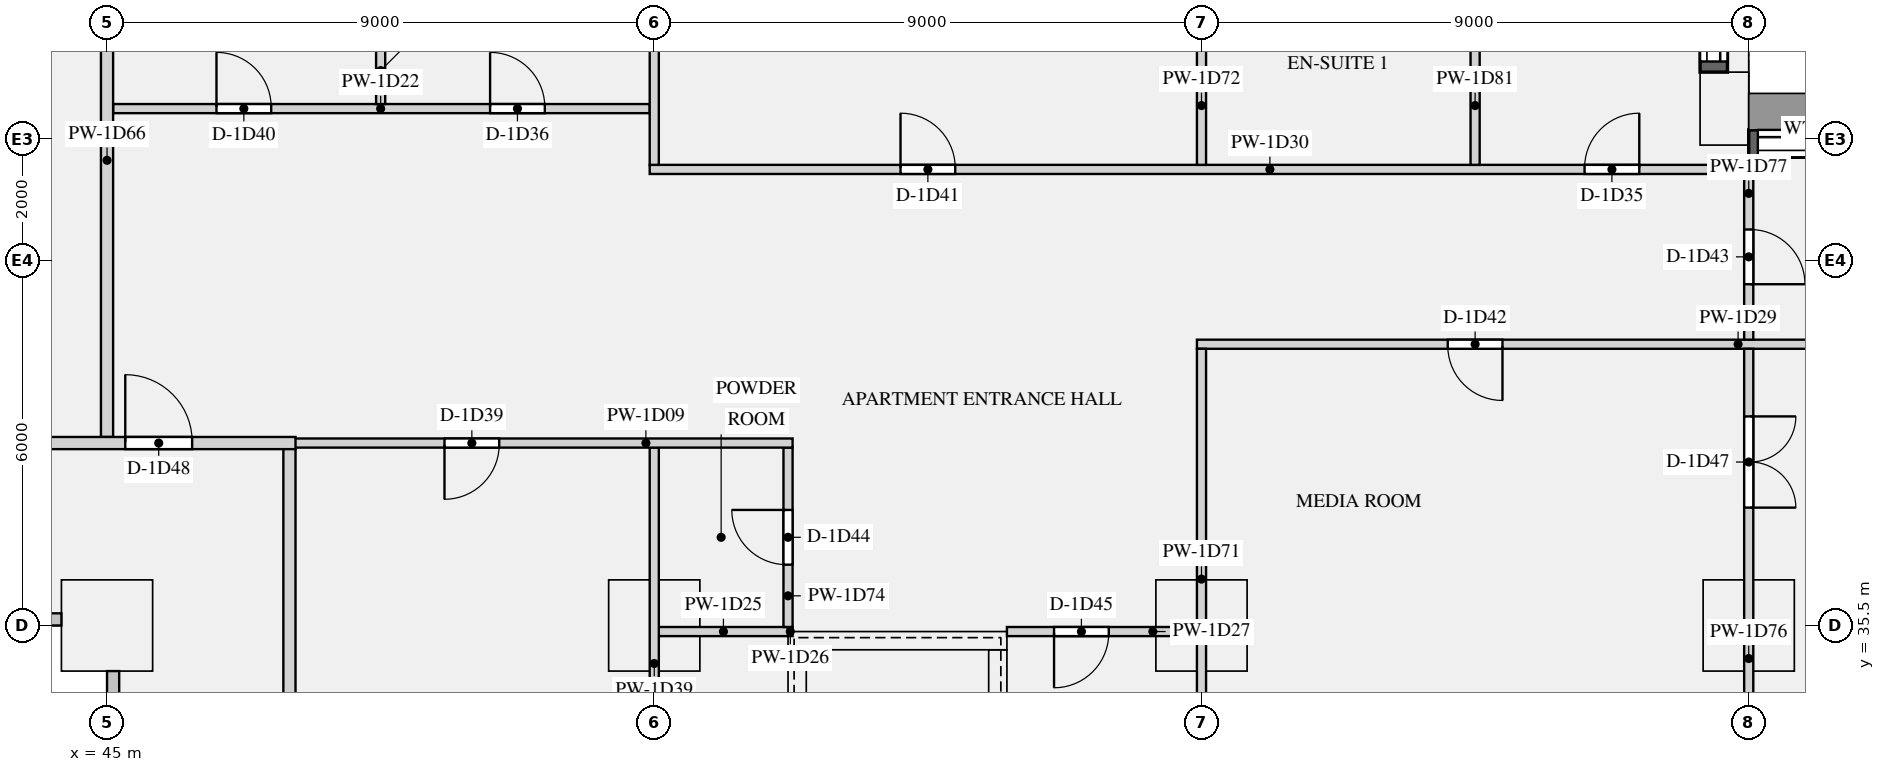
"""IFC4 building model, lengths in metres.
Left out: names, types, materials, properties, quantities, classifications, styles, units other than length and angle.
Written with IfcOpenShell. Run it as: python <this file> out.ifc"""

import sys

from ifc_helpers import new_model, si_unit, direction, frame, frame_2d, origin, origin_2d, place, context, subcontext, project, spatial, rectangle, extrude, element, fill, save


model = new_model("IFC4")
c1 = context("Model", 3, precision=1e-05, world=origin(), true_north=direction((0.0, 1.0)))
c2 = subcontext(c1, "Body", "Model", "MODEL_VIEW")
j1 = project(units=[si_unit("LENGTHUNIT", "METRE"), si_unit("PLANEANGLEUNIT", "RADIAN")], contexts=[c1])
p1 = place(None, origin())
s1 = spatial("IfcSite", under=j1, at=p1, CompositionType="ELEMENT")
p2 = place(p1, origin())
s2 = spatial("IfcBuilding", under=s1, at=p2, CompositionType="ELEMENT")
p3 = place(p2, frame((0.0, 0.0, 47.85)))
s3 = spatial("IfcBuildingStorey", under=s2, at=p3, CompositionType="ELEMENT", Elevation=47.85)
p4 = place(p3, frame((71.6, 44.0, 0.0), z_axis=(0.0, 0.0, 1.0), x_axis=(0.0, 1.0, 0.0)))
e1 = element("IfcColumn", 1, at=p4, inside=s3, PredefinedType="USERDEFINED", context=c2, shape_type="SweptSolid", body=[
    extrude(rectangle(XDim=1.2, YDim=0.8, at=origin_2d()), origin(), (0.0, 0.0, 1.0), 3.15),
])
for number, where, z_axis, x_axis in (
    (2, (45.0, 35.5, 0.0), (0.0, 0.0, 1.0), (1.0, 0.0, 0.0)),
    (3, (54.0, 35.5, 0.0), (0.0, 0.0, 1.0), (1.0, 0.0, 0.0)),
    (4, (63.0, 35.5, 0.0), (0.0, 0.0, 1.0), (1.0, 0.0, 0.0)),
    (5, (72.0, 35.5, 0.0), (0.0, 0.0, 1.0), (1.0, 0.0, 0.0)),
):
    element("IfcColumn", number, at=place(p3, frame(where, z_axis=z_axis, x_axis=x_axis)), inside=s3, PredefinedType="COLUMN", context=c2, shape_type="SweptSolid", body=[
        extrude(rectangle(XDim=1.5, YDim=1.5, at=origin_2d()), origin(), (0.0, 0.0, 1.0), 3.15),
    ])
p5 = place(p3, frame((56.2, 35.25, 0.0), z_axis=(0.0, 0.0, 1.0), x_axis=(1.0, 0.0, 0.0)))
e6 = element("IfcWall", 6, at=p5, inside=s3, PredefinedType="SHEAR", context=c2, shape_type="SweptSolid", body=[
    extrude(rectangle(XDim=3.6, YDim=0.3, at=frame_2d((1.8, 0.0))), origin(), (0.0, 0.0, 1.0), 3.15),
])
for number, where, z_axis, x_axis in (
    (7, (56.35, 27.3, 0.0), (0.0, 0.0, 1.0), (0.0, 1.0, 0.0)),
    (8, (59.65, 27.3, 0.0), (0.0, 0.0, 1.0), (0.0, 1.0, 0.0)),
):
    element("IfcWall", number, at=place(p3, frame(where, z_axis=z_axis, x_axis=x_axis)), inside=s3, PredefinedType="SHEAR", context=c2, shape_type="SweptSolid", body=[
        extrude(rectangle(XDim=7.8, YDim=0.3, at=frame_2d((3.9, 0.0))), origin(), (0.0, 0.0, 1.0), 3.15),
    ])
p6 = place(p3, frame((75.3, 43.425, 0.9), z_axis=(0.0, 0.0, 1.0), x_axis=(-1.0, 0.0, 0.0)))
e9 = element("IfcWall", 9, at=p6, inside=s3, PredefinedType="SOLIDWALL", context=c2, shape_type="SweptSolid", body=[
    extrude(rectangle(XDim=3.3, YDim=0.45, at=frame_2d((1.65, 0.0))), origin(), (0.0, 0.0, 1.0), 1.93),
])
p7 = place(p6, frame((0.15, 0.0, 0.15)))
e10 = element("IfcOpeningElement", 10, at=p7, cuts=e9, PredefinedType="OPENING", context=c2, shape_type="SweptSolid", body=[
    extrude(rectangle(XDim=3.0, YDim=1.5, at=frame_2d((1.5, 0.75))), frame((0.0, 0.235, 0.0), z_axis=(0.0, -1.0, 0.0), x_axis=(1.0, 0.0, 0.0)), (0.0, 0.0, 1.0), 0.47),
])
p8 = place(p3, frame((71.425, 44.6, 0.9), z_axis=(0.0, 0.0, 1.0), x_axis=(0.0, 1.0, 0.0)))
e11 = element("IfcWall", 11, at=p8, inside=s3, PredefinedType="SOLIDWALL", context=c2, shape_type="SweptSolid", body=[
    extrude(rectangle(XDim=3.1, YDim=0.45, at=frame_2d((1.55, 0.0))), origin(), (0.0, 0.0, 1.0), 1.93),
])
p9 = place(p8, frame((0.175, 0.0, 0.15)))
e12 = element("IfcOpeningElement", 12, at=p9, cuts=e11, PredefinedType="OPENING", context=c2, shape_type="SweptSolid", body=[
    extrude(rectangle(XDim=2.75, YDim=1.5, at=frame_2d((1.375, 0.75))), frame((0.0, 0.235, 0.0), z_axis=(0.0, -1.0, 0.0), x_axis=(1.0, 0.0, 0.0)), (0.0, 0.0, 1.0), 0.47),
])
p10 = place(p3, frame((47.9, 38.5, 0.0), z_axis=(0.0, 0.0, 1.0), x_axis=(1.0, 0.0, 0.0)))
e13 = element("IfcWall", 13, at=p10, inside=s3, PredefinedType="PARTITIONING", context=c2, shape_type="SweptSolid", body=[
    extrude(rectangle(XDim=8.375, YDim=0.15, at=frame_2d((4.188, 0.0))), origin(), (0.0, 0.0, 1.0), 2.83),
])
p11 = place(p10, frame((2.65, 0.0, 0.0)))
e14 = element("IfcOpeningElement", 14, at=p11, cuts=e13, PredefinedType="OPENING", context=c2, shape_type="SweptSolid", body=[
    extrude(rectangle(XDim=0.9, YDim=2.1, at=frame_2d((0.45, 1.05))), frame((0.0, 0.085, 0.0), z_axis=(0.0, -1.0, 0.0), x_axis=(1.0, 0.0, 0.0)), (0.0, 0.0, 1.0), 0.17),
])
p12 = place(p3, frame((23.9, 38.5, 0.0), z_axis=(0.0, 0.0, 1.0), x_axis=(1.0, 0.0, 0.0)))
e15 = element("IfcWall", 15, at=p12, inside=s3, PredefinedType="PARTITIONING", context=c2, shape_type="SweptSolid", body=[
    extrude(rectangle(XDim=24.2, YDim=0.2, at=frame_2d((12.1, 0.0))), origin(), (0.0, 0.0, 1.0), 2.83),
])
p13 = place(p12, frame((3.55, 0.0, 0.0)))
e16 = element("IfcOpeningElement", 16, at=p13, cuts=e15, PredefinedType="OPENING", context=c2, shape_type="SweptSolid", body=[
    extrude(rectangle(XDim=1.1, YDim=2.1, at=frame_2d((0.55, 1.05))), frame((0.0, 0.11, 0.0), z_axis=(0.0, -1.0, 0.0), x_axis=(1.0, 0.0, 0.0)), (0.0, 0.0, 1.0), 0.22),
])
p14 = place(p12, frame((21.4, 0.0, 0.0)))
e17 = element("IfcOpeningElement", 17, at=p14, cuts=e15, PredefinedType="OPENING", context=c2, shape_type="SweptSolid", body=[
    extrude(rectangle(XDim=1.1, YDim=2.1, at=frame_2d((0.55, 1.05))), frame((0.0, 0.11, 0.0), z_axis=(0.0, -1.0, 0.0), x_axis=(1.0, 0.0, 0.0)), (0.0, 0.0, 1.0), 0.22),
])
p15 = place(p3, frame((45.1, 44.0, 0.0), z_axis=(0.0, 0.0, 1.0), x_axis=(1.0, 0.0, 0.0)))
e18 = element("IfcWall", 18, at=p15, inside=s3, PredefinedType="PARTITIONING", context=c2, shape_type="SweptSolid", body=[
    extrude(rectangle(XDim=8.825, YDim=0.15, at=frame_2d((4.413, 0.0))), origin(), (0.0, 0.0, 1.0), 2.83),
])
p16 = place(p15, frame((6.2, 0.0, 0.0)))
e19 = element("IfcOpeningElement", 19, at=p16, cuts=e18, PredefinedType="OPENING", context=c2, shape_type="SweptSolid", body=[
    extrude(rectangle(XDim=0.9, YDim=2.1, at=frame_2d((0.45, 1.05))), frame((0.0, 0.085, 0.0), z_axis=(0.0, -1.0, 0.0), x_axis=(1.0, 0.0, 0.0)), (0.0, 0.0, 1.0), 0.17),
])
p17 = place(p15, frame((1.7, 0.0, 0.0)))
e20 = element("IfcOpeningElement", 20, at=p17, cuts=e18, PredefinedType="OPENING", context=c2, shape_type="SweptSolid", body=[
    extrude(rectangle(XDim=0.9, YDim=2.1, at=frame_2d((0.45, 1.05))), frame((0.0, 0.085, 0.0), z_axis=(0.0, -1.0, 0.0), x_axis=(1.0, 0.0, 0.0)), (0.0, 0.0, 1.0), 0.17),
])
p18 = place(p3, frame((54.075, 35.4, 0.0), z_axis=(0.0, 0.0, 1.0), x_axis=(1.0, 0.0, 0.0)))
e21 = element("IfcWall", 21, at=p18, inside=s3, PredefinedType="PARTITIONING", context=c2, shape_type="SweptSolid", body=[
    extrude(rectangle(XDim=2.125, YDim=0.15, at=frame_2d((1.062, 0.0))), origin(), (0.0, 0.0, 1.0), 2.83),
])
p19 = place(p3, frame((56.2, 35.4, 0.0), z_axis=(0.0, 0.0, 1.0), x_axis=(1.0, 0.0, 0.0)))
e22 = element("IfcWall", 22, at=p19, inside=s3, PredefinedType="PARTITIONING", context=c2, shape_type="SweptSolid", body=[
    extrude(rectangle(XDim=0.075, YDim=0.15, at=frame_2d((0.038, 0.0))), origin(), (0.0, 0.0, 1.0), 2.83),
])
p20 = place(p3, frame((59.8, 35.4, 0.0), z_axis=(0.0, 0.0, 1.0), x_axis=(1.0, 0.0, 0.0)))
e23 = element("IfcWall", 23, at=p20, inside=s3, PredefinedType="PARTITIONING", context=c2, shape_type="SweptSolid", body=[
    extrude(rectangle(XDim=3.125, YDim=0.15, at=frame_2d((1.562, 0.0))), origin(), (0.0, 0.0, 1.0), 2.83),
])
p21 = place(p20, frame((0.775, 0.0, 0.0)))
e24 = element("IfcOpeningElement", 24, at=p21, cuts=e23, PredefinedType="OPENING", context=c2, shape_type="SweptSolid", body=[
    extrude(rectangle(XDim=0.9, YDim=2.1, at=frame_2d((0.45, 1.05))), frame((0.0, 0.085, 0.0), z_axis=(0.0, -1.0, 0.0), x_axis=(1.0, 0.0, 0.0)), (0.0, 0.0, 1.0), 0.17),
])
p22 = place(p3, frame((62.925, 40.125, 0.0), z_axis=(0.0, 0.0, 1.0), x_axis=(1.0, 0.0, 0.0)))
e25 = element("IfcWall", 25, at=p22, inside=s3, PredefinedType="PARTITIONING", context=c2, shape_type="SweptSolid", body=[
    extrude(rectangle(XDim=12.775, YDim=0.15, at=frame_2d((6.387, 0.0))), origin(), (0.0, 0.0, 1.0), 2.83),
])
p23 = place(p22, frame((4.125, 0.0, 0.0)))
e26 = element("IfcOpeningElement", 26, at=p23, cuts=e25, PredefinedType="OPENING", context=c2, shape_type="SweptSolid", body=[
    extrude(rectangle(XDim=0.9, YDim=2.1, at=frame_2d((0.45, 1.05))), frame((0.0, 0.085, 0.0), z_axis=(0.0, -1.0, 0.0), x_axis=(1.0, 0.0, 0.0)), (0.0, 0.0, 1.0), 0.17),
])
p24 = place(p3, frame((53.925, 43.0, 0.0), z_axis=(0.0, 0.0, 1.0), x_axis=(1.0, 0.0, 0.0)))
e27 = element("IfcWall", 27, at=p24, inside=s3, PredefinedType="PARTITIONING", context=c2, shape_type="SweptSolid", body=[
    extrude(rectangle(XDim=18.0, YDim=0.15, at=frame_2d((9.0, 0.0))), origin(), (0.0, 0.0, 1.0), 2.83),
])
p25 = place(p24, frame((15.375, 0.0, 0.0)))
e28 = element("IfcOpeningElement", 28, at=p25, cuts=e27, PredefinedType="OPENING", context=c2, shape_type="SweptSolid", body=[
    extrude(rectangle(XDim=0.9, YDim=2.1, at=frame_2d((0.45, 1.05))), frame((0.0, 0.085, 0.0), z_axis=(0.0, -1.0, 0.0), x_axis=(1.0, 0.0, 0.0)), (0.0, 0.0, 1.0), 0.17),
])
p26 = place(p24, frame((4.125, 0.0, 0.0)))
e29 = element("IfcOpeningElement", 29, at=p26, cuts=e27, PredefinedType="OPENING", context=c2, shape_type="SweptSolid", body=[
    extrude(rectangle(XDim=0.9, YDim=2.1, at=frame_2d((0.45, 1.05))), frame((0.0, 0.085, 0.0), z_axis=(0.0, -1.0, 0.0), x_axis=(1.0, 0.0, 0.0)), (0.0, 0.0, 1.0), 0.17),
])
p27 = place(p3, frame((54.0, 27.1, 0.0), z_axis=(0.0, 0.0, 1.0), x_axis=(0.0, 1.0, 0.0)))
e30 = element("IfcWall", 30, at=p27, inside=s3, PredefinedType="PARTITIONING", context=c2, shape_type="SweptSolid", body=[
    extrude(rectangle(XDim=11.325, YDim=0.15, at=frame_2d((5.663, 0.0))), origin(), (0.0, 0.0, 1.0), 2.83),
])
p28 = place(p27, frame((3.325, 0.0, 0.0)))
e31 = element("IfcOpeningElement", 31, at=p28, cuts=e30, PredefinedType="OPENING", context=c2, shape_type="SweptSolid", body=[
    extrude(rectangle(XDim=0.9, YDim=2.1, at=frame_2d((0.45, 1.05))), frame((0.0, 0.085, 0.0), z_axis=(0.0, -1.0, 0.0), x_axis=(1.0, 0.0, 0.0)), (0.0, 0.0, 1.0), 0.17),
])
p29 = place(p3, frame((54.0, 43.075, 0.0), z_axis=(0.0, 0.0, 1.0), x_axis=(0.0, 1.0, 0.0)))
e32 = element("IfcWall", 32, at=p29, inside=s3, PredefinedType="PARTITIONING", context=c2, shape_type="SweptSolid", body=[
    extrude(rectangle(XDim=4.625, YDim=0.15, at=frame_2d((2.312, 0.0))), origin(), (0.0, 0.0, 1.0), 2.83),
])
p30 = place(p3, frame((48.0, 27.1, 0.0), z_axis=(0.0, 0.0, 1.0), x_axis=(0.0, 1.0, 0.0)))
e33 = element("IfcWall", 33, at=p30, inside=s3, PredefinedType="PARTITIONING", context=c2, shape_type="SweptSolid", body=[
    extrude(rectangle(XDim=11.325, YDim=0.2, at=frame_2d((5.663, 0.0))), origin(), (0.0, 0.0, 1.0), 2.83),
])
p31 = place(p3, frame((45.0, 38.6, 0.0), z_axis=(0.0, 0.0, 1.0), x_axis=(0.0, 1.0, 0.0)))
e34 = element("IfcWall", 34, at=p31, inside=s3, PredefinedType="PARTITIONING", context=c2, shape_type="SweptSolid", body=[
    extrude(rectangle(XDim=9.1, YDim=0.2, at=frame_2d((4.55, 0.0))), origin(), (0.0, 0.0, 1.0), 2.83),
])
p32 = place(p3, frame((63.0, 32.475, 0.0), z_axis=(0.0, 0.0, 1.0), x_axis=(0.0, 1.0, 0.0)))
e35 = element("IfcWall", 35, at=p32, inside=s3, PredefinedType="PARTITIONING", context=c2, shape_type="SweptSolid", body=[
    extrude(rectangle(XDim=7.575, YDim=0.15, at=frame_2d((3.788, 0.0))), origin(), (0.0, 0.0, 1.0), 2.83),
])
p33 = place(p3, frame((63.0, 43.075, 0.0), z_axis=(0.0, 0.0, 1.0), x_axis=(0.0, 1.0, 0.0)))
e36 = element("IfcWall", 36, at=p33, inside=s3, PredefinedType="PARTITIONING", context=c2, shape_type="SweptSolid", body=[
    extrude(rectangle(XDim=4.625, YDim=0.15, at=frame_2d((2.312, 0.0))), origin(), (0.0, 0.0, 1.0), 2.83),
])
p34 = place(p33, frame((1.95, 0.0, 0.0)))
e37 = element("IfcOpeningElement", 37, at=p34, cuts=e36, PredefinedType="OPENING", context=c2, shape_type="SweptSolid", body=[
    extrude(rectangle(XDim=0.8, YDim=2.1, at=frame_2d((0.4, 1.05))), frame((0.0, 0.085, 0.0), z_axis=(0.0, -1.0, 0.0), x_axis=(1.0, 0.0, 0.0)), (0.0, 0.0, 1.0), 0.17),
])
p35 = place(p3, frame((56.2, 35.475, 0.0), z_axis=(0.0, 0.0, 1.0), x_axis=(0.0, 1.0, 0.0)))
e38 = element("IfcWall", 38, at=p35, inside=s3, PredefinedType="PARTITIONING", context=c2, shape_type="SweptSolid", body=[
    extrude(rectangle(XDim=2.95, YDim=0.15, at=frame_2d((1.475, 0.0))), origin(), (0.0, 0.0, 1.0), 2.83),
])
p36 = place(p35, frame((1.025, 0.0, 0.0)))
e39 = element("IfcOpeningElement", 39, at=p36, cuts=e38, PredefinedType="OPENING", context=c2, shape_type="SweptSolid", body=[
    extrude(rectangle(XDim=0.9, YDim=2.1, at=frame_2d((0.45, 1.05))), frame((0.0, 0.085, 0.0), z_axis=(0.0, -1.0, 0.0), x_axis=(1.0, 0.0, 0.0)), (0.0, 0.0, 1.0), 0.17),
])
p37 = place(p3, frame((72.0, 32.475, 0.0), z_axis=(0.0, 0.0, 1.0), x_axis=(0.0, 1.0, 0.0)))
e40 = element("IfcWall", 40, at=p37, inside=s3, PredefinedType="PARTITIONING", context=c2, shape_type="SweptSolid", body=[
    extrude(rectangle(XDim=7.575, YDim=0.15, at=frame_2d((3.788, 0.0))), origin(), (0.0, 0.0, 1.0), 2.83),
])
p38 = place(p37, frame((4.963, 0.0, 0.0)))
e41 = element("IfcOpeningElement", 41, at=p38, cuts=e40, PredefinedType="OPENING", context=c2, shape_type="SweptSolid", body=[
    extrude(rectangle(XDim=1.5, YDim=2.1, at=frame_2d((0.75, 1.05))), frame((0.0, 0.085, 0.0), z_axis=(0.0, -1.0, 0.0), x_axis=(1.0, 0.0, 0.0)), (0.0, 0.0, 1.0), 0.17),
])
p39 = place(p3, frame((72.0, 40.2, 0.0), z_axis=(0.0, 0.0, 1.0), x_axis=(0.0, 1.0, 0.0)))
e42 = element("IfcWall", 42, at=p39, inside=s3, PredefinedType="PARTITIONING", context=c2, shape_type="SweptSolid", body=[
    extrude(rectangle(XDim=3.0, YDim=0.15, at=frame_2d((1.5, 0.0))), origin(), (0.0, 0.0, 1.0), 2.83),
])
p40 = place(p39, frame((0.912, 0.0, 0.0)))
e43 = element("IfcOpeningElement", 43, at=p40, cuts=e42, PredefinedType="OPENING", context=c2, shape_type="SweptSolid", body=[
    extrude(rectangle(XDim=0.9, YDim=2.1, at=frame_2d((0.45, 1.05))), frame((0.0, 0.085, 0.0), z_axis=(0.0, -1.0, 0.0), x_axis=(1.0, 0.0, 0.0)), (0.0, 0.0, 1.0), 0.17),
])
p41 = place(p3, frame((49.5, 44.075, 0.0), z_axis=(0.0, 0.0, 1.0), x_axis=(0.0, 1.0, 0.0)))
e44 = element("IfcWall", 44, at=p41, inside=s3, PredefinedType="PARTITIONING", context=c2, shape_type="SweptSolid", body=[
    extrude(rectangle(XDim=3.625, YDim=0.15, at=frame_2d((1.812, 0.0))), origin(), (0.0, 0.0, 1.0), 2.83),
])
p42 = place(p41, frame((1.1, 0.0, 0.0)))
e45 = element("IfcOpeningElement", 45, at=p42, cuts=e44, PredefinedType="OPENING", context=c2, shape_type="SweptSolid", body=[
    extrude(rectangle(XDim=1.5, YDim=2.1, at=frame_2d((0.75, 1.05))), frame((0.0, 0.085, 0.0), z_axis=(0.0, -1.0, 0.0), x_axis=(1.0, 0.0, 0.0)), (0.0, 0.0, 1.0), 0.17),
])
p43 = place(p3, frame((67.5, 43.075, 0.0), z_axis=(0.0, 0.0, 1.0), x_axis=(0.0, 1.0, 0.0)))
e46 = element("IfcWall", 46, at=p43, inside=s3, PredefinedType="PARTITIONING", context=c2, shape_type="SweptSolid", body=[
    extrude(rectangle(XDim=4.625, YDim=0.15, at=frame_2d((2.312, 0.0))), origin(), (0.0, 0.0, 1.0), 2.83),
])
p44 = place(p43, frame((1.95, 0.0, 0.0)))
e47 = element("IfcOpeningElement", 47, at=p44, cuts=e46, PredefinedType="OPENING", context=c2, shape_type="SweptSolid", body=[
    extrude(rectangle(XDim=0.8, YDim=2.1, at=frame_2d((0.4, 1.05))), frame((0.0, 0.085, 0.0), z_axis=(0.0, -1.0, 0.0), x_axis=(1.0, 0.0, 0.0)), (0.0, 0.0, 1.0), 0.17),
])
p45 = place(p7, origin())
e48 = element("IfcWindow", 48, at=p45, inside=s3, PartitioningType="SINGLE_PANEL", PredefinedType="WINDOW", context=c2, shape_type="SweptSolid", body=[
    extrude(rectangle(XDim=3.0, YDim=1.5, at=frame_2d((1.5, 0.75))), frame((0.0, -0.065, 0.0), z_axis=(0.0, -1.0, 0.0), x_axis=(1.0, 0.0, 0.0)), (0.0, 0.0, 1.0), 0.06),
])
fill(e10, e48)
p46 = place(p9, origin())
e49 = element("IfcWindow", 49, at=p46, inside=s3, PartitioningType="SINGLE_PANEL", PredefinedType="WINDOW", context=c2, shape_type="SweptSolid", body=[
    extrude(rectangle(XDim=2.75, YDim=1.5, at=frame_2d((1.375, 0.75))), frame((0.0, -0.065, 0.0), z_axis=(0.0, -1.0, 0.0), x_axis=(1.0, 0.0, 0.0)), (0.0, 0.0, 1.0), 0.06),
])
fill(e12, e49)
p47 = place(p25, origin())
e50 = element("IfcDoor", 50, at=p47, inside=s3, OperationType="SINGLE_SWING_RIGHT", PredefinedType="DOOR", context=c2, shape_type="SweptSolid", body=[
    extrude(rectangle(XDim=0.9, YDim=2.1, at=frame_2d((0.45, 1.05))), frame((0.0, 0.025, 0.0), z_axis=(0.0, -1.0, 0.0), x_axis=(1.0, 0.0, 0.0)), (0.0, 0.0, 1.0), 0.05),
])
fill(e28, e50)
p48 = place(p16, origin())
e51 = element("IfcDoor", 51, at=p48, inside=s3, OperationType="SINGLE_SWING_LEFT", PredefinedType="DOOR", context=c2, shape_type="SweptSolid", body=[
    extrude(rectangle(XDim=0.9, YDim=2.1, at=frame_2d((0.45, 1.05))), frame((0.0, 0.025, 0.0), z_axis=(0.0, -1.0, 0.0), x_axis=(1.0, 0.0, 0.0)), (0.0, 0.0, 1.0), 0.05),
])
fill(e19, e51)
p49 = place(p11, frame((0.9, 0.0, 0.0), z_axis=(0.0, 0.0, 1.0), x_axis=(-1.0, 0.0, 0.0)))
e52 = element("IfcDoor", 52, at=p49, inside=s3, OperationType="SINGLE_SWING_RIGHT", PredefinedType="DOOR", context=c2, shape_type="SweptSolid", body=[
    extrude(rectangle(XDim=0.9, YDim=2.1, at=frame_2d((0.45, 1.05))), frame((0.0, 0.025, 0.0), z_axis=(0.0, -1.0, 0.0), x_axis=(1.0, 0.0, 0.0)), (0.0, 0.0, 1.0), 0.05),
])
fill(e14, e52)
p50 = place(p17, origin())
e53 = element("IfcDoor", 53, at=p50, inside=s3, OperationType="SINGLE_SWING_LEFT", PredefinedType="DOOR", context=c2, shape_type="SweptSolid", body=[
    extrude(rectangle(XDim=0.9, YDim=2.1, at=frame_2d((0.45, 1.05))), frame((0.0, 0.025, 0.0), z_axis=(0.0, -1.0, 0.0), x_axis=(1.0, 0.0, 0.0)), (0.0, 0.0, 1.0), 0.05),
])
fill(e20, e53)
p51 = place(p26, origin())
e54 = element("IfcDoor", 54, at=p51, inside=s3, OperationType="SINGLE_SWING_LEFT", PredefinedType="DOOR", context=c2, shape_type="SweptSolid", body=[
    extrude(rectangle(XDim=0.9, YDim=2.1, at=frame_2d((0.45, 1.05))), frame((0.0, 0.025, 0.0), z_axis=(0.0, -1.0, 0.0), x_axis=(1.0, 0.0, 0.0)), (0.0, 0.0, 1.0), 0.05),
])
fill(e29, e54)
p52 = place(p23, frame((0.9, 0.0, 0.0), z_axis=(0.0, 0.0, 1.0), x_axis=(-1.0, 0.0, 0.0)))
e55 = element("IfcDoor", 55, at=p52, inside=s3, OperationType="SINGLE_SWING_LEFT", PredefinedType="DOOR", context=c2, shape_type="SweptSolid", body=[
    extrude(rectangle(XDim=0.9, YDim=2.1, at=frame_2d((0.45, 1.05))), frame((0.0, 0.025, 0.0), z_axis=(0.0, -1.0, 0.0), x_axis=(1.0, 0.0, 0.0)), (0.0, 0.0, 1.0), 0.05),
])
fill(e26, e55)
p53 = place(p40, frame((0.9, 0.0, 0.0), z_axis=(0.0, 0.0, 1.0), x_axis=(-1.0, 0.0, 0.0)))
e56 = element("IfcDoor", 56, at=p53, inside=s3, OperationType="SINGLE_SWING_RIGHT", PredefinedType="DOOR", context=c2, shape_type="SweptSolid", body=[
    extrude(rectangle(XDim=0.9, YDim=2.1, at=frame_2d((0.45, 1.05))), frame((0.0, 0.025, 0.0), z_axis=(0.0, -1.0, 0.0), x_axis=(1.0, 0.0, 0.0)), (0.0, 0.0, 1.0), 0.05),
])
fill(e43, e56)
p54 = place(p36, origin())
e57 = element("IfcDoor", 57, at=p54, inside=s3, OperationType="SINGLE_SWING_RIGHT", PredefinedType="DOOR", context=c2, shape_type="SweptSolid", body=[
    extrude(rectangle(XDim=0.9, YDim=2.1, at=frame_2d((0.45, 1.05))), frame((0.0, 0.025, 0.0), z_axis=(0.0, -1.0, 0.0), x_axis=(1.0, 0.0, 0.0)), (0.0, 0.0, 1.0), 0.05),
])
fill(e39, e57)
p55 = place(p21, frame((0.9, 0.0, 0.0), z_axis=(0.0, 0.0, 1.0), x_axis=(-1.0, 0.0, 0.0)))
e58 = element("IfcDoor", 58, at=p55, inside=s3, OperationType="SINGLE_SWING_RIGHT", PredefinedType="DOOR", context=c2, shape_type="SweptSolid", body=[
    extrude(rectangle(XDim=0.9, YDim=2.1, at=frame_2d((0.45, 1.05))), frame((0.0, 0.025, 0.0), z_axis=(0.0, -1.0, 0.0), x_axis=(1.0, 0.0, 0.0)), (0.0, 0.0, 1.0), 0.05),
])
fill(e24, e58)
p56 = place(p38, frame((1.5, 0.0, 0.0), z_axis=(0.0, 0.0, 1.0), x_axis=(-1.0, 0.0, 0.0)))
e59 = element("IfcDoor", 59, at=p56, inside=s3, OperationType="DOUBLE_DOOR_SINGLE_SWING", PredefinedType="DOOR", context=c2, shape_type="SweptSolid", body=[
    extrude(rectangle(XDim=1.5, YDim=2.1, at=frame_2d((0.75, 1.05))), frame((0.0, 0.025, 0.0), z_axis=(0.0, -1.0, 0.0), x_axis=(1.0, 0.0, 0.0)), (0.0, 0.0, 1.0), 0.05),
])
fill(e41, e59)
p57 = place(p14, origin())
e60 = element("IfcDoor", 60, at=p57, inside=s3, OperationType="SINGLE_SWING_LEFT", PredefinedType="DOOR", context=c2, shape_type="SweptSolid", body=[
    extrude(rectangle(XDim=1.1, YDim=2.1, at=frame_2d((0.55, 1.05))), frame((0.0, 0.025, 0.0), z_axis=(0.0, -1.0, 0.0), x_axis=(1.0, 0.0, 0.0)), (0.0, 0.0, 1.0), 0.05),
])
fill(e17, e60)
save(model, sys.argv[1])
